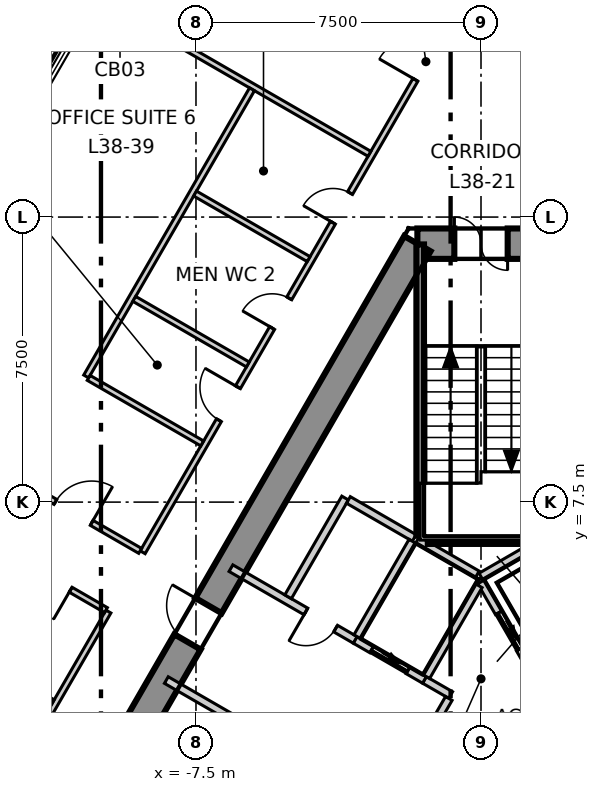
"""IFC4 building model, lengths in metres.
Left out: names, types, materials, properties, quantities, classifications, styles, units other than length and angle.
Written with IfcOpenShell. Run it as: python <this file> out.ifc"""

import sys

from ifc_helpers import new_model, si_unit, direction, frame, frame_2d, origin, place, context, subcontext, project, spatial, polyline, rectangle, outline, extrude, element, fill, save


model = new_model("IFC4")
c1 = context("Model", 3, precision=1e-05, world=origin(), true_north=direction((0.0, 1.0)))
c2 = subcontext(c1, "Body", "Model", "MODEL_VIEW")
j1 = project(units=[si_unit("LENGTHUNIT", "METRE"), si_unit("PLANEANGLEUNIT", "RADIAN")], contexts=[c1])
p1 = place(None, origin())
s1 = spatial("IfcSite", under=j1, at=p1, CompositionType="ELEMENT")
p2 = place(p1, origin())
s2 = spatial("IfcBuilding", under=s1, at=p2, CompositionType="ELEMENT")
p3 = place(p2, frame((0.0, 0.0, 164.3)))
s3 = spatial("IfcBuildingStorey", under=s2, at=p3, CompositionType="ELEMENT", Elevation=164.3)
p4 = place(p3, frame((1.674, 14.3, -0.3), z_axis=(0.0, 0.0, 1.0), x_axis=(-1.0, 0.0, 0.0)))
e1 = element("IfcWall", 1, at=p4, inside=s3, PredefinedType="SHEAR", context=c2, shape_type="SweptSolid", body=[
    extrude(outline(polyline([(-0.231, -0.4), (1.674, -0.4), (3.579, -0.4), (3.117, 0.4), (1.674, 0.4), (0.231, 0.4), (-0.231, -0.4)])), origin(), (0.0, 0.0, 1.0), 4.0),
])
p5 = place(p4, frame((0.974, 0.0, 0.3)))
e2 = element("IfcOpeningElement", 2, at=p5, cuts=e1, PredefinedType="OPENING", context=c2, shape_type="SweptSolid", body=[
    extrude(rectangle(XDim=1.4, YDim=2.1, at=frame_2d((0.7, 1.05))), frame((0.0, 0.41, 0.0), z_axis=(0.0, -1.0, 0.0), x_axis=(1.0, 0.0, 0.0)), (0.0, 0.0, 1.0), 0.82),
])
p6 = place(p3, frame((-1.674, 14.3, -0.3), z_axis=(0.0, 0.0, 1.0), x_axis=(-0.499995765644, -0.866027848477, 0.0)))
e3 = element("IfcWall", 3, at=p6, inside=s3, PredefinedType="SHEAR", context=c2, shape_type="SweptSolid", body=[
    extrude(outline(polyline([(-0.231, -0.4), (1.732, -0.4), (3.695, -0.4), (5.658, -0.4), (7.621, -0.4), (9.584, -0.4), (11.547, -0.4), (13.51, -0.4), (15.473, -0.4), (17.436, -0.4), (19.399, -0.4), (21.362, -0.4), (23.325, -0.4), (22.863, 0.4), (20.977, 0.4), (19.091, 0.4), (17.205, 0.4), (15.319, 0.4), (13.433, 0.4), (11.547, 0.4), (9.661, 0.4), (7.775, 0.4), (5.889, 0.4), (4.003, 0.4), (2.117, 0.4), (0.231, 0.4), (-0.231, -0.4)])), origin(), (0.0, 0.0, 1.0), 4.0),
])
p7 = place(p6, frame((10.997, 0.0, 0.3)))
e4 = element("IfcOpeningElement", 4, at=p7, cuts=e3, PredefinedType="OPENING", context=c2, shape_type="SweptSolid", body=[
    extrude(rectangle(XDim=1.1, YDim=2.1, at=frame_2d((0.55, 1.05))), frame((0.0, 0.41, 0.0), z_axis=(0.0, -1.0, 0.0), x_axis=(1.0, 0.0, 0.0)), (0.0, 0.0, 1.0), 0.82),
])
p8 = place(p3, frame((-2.972, 33.16, 0.0), z_axis=(0.0, 0.0, 1.0), x_axis=(-0.500009959561, -0.866019653553, 0.0)))
e5 = element("IfcWall", 5, at=p8, inside=s3, PredefinedType="ELEMENTEDWALL", context=c2, shape_type="SweptSolid", body=[
    extrude(rectangle(XDim=54.443, YDim=0.2, at=frame_2d((27.222, 0.0))), origin(), (0.0, 0.0, 1.0), 3.7),
])
p9 = place(p8, frame((2.094, 0.0, 0.9)))
e6 = element("IfcOpeningElement", 6, at=p9, cuts=e5, PredefinedType="OPENING", context=c2, shape_type="SweptSolid", body=[
    extrude(rectangle(XDim=4.9, YDim=2.5, at=frame_2d((2.45, 1.25))), frame((0.0, 0.11, 0.0), z_axis=(0.0, -1.0, 0.0), x_axis=(1.0, 0.0, 0.0)), (0.0, 0.0, 1.0), 0.22),
])
p10 = place(p8, frame((8.576, 0.0, 0.9)))
e7 = element("IfcOpeningElement", 7, at=p10, cuts=e5, PredefinedType="OPENING", context=c2, shape_type="SweptSolid", body=[
    extrude(rectangle(XDim=4.9, YDim=2.5, at=frame_2d((2.45, 1.25))), frame((0.0, 0.11, 0.0), z_axis=(0.0, -1.0, 0.0), x_axis=(1.0, 0.0, 0.0)), (0.0, 0.0, 1.0), 0.22),
])
p11 = place(p8, frame((15.058, 0.0, 0.9)))
e8 = element("IfcOpeningElement", 8, at=p11, cuts=e5, PredefinedType="OPENING", context=c2, shape_type="SweptSolid", body=[
    extrude(rectangle(XDim=4.9, YDim=2.5, at=frame_2d((2.45, 1.25))), frame((0.0, 0.11, 0.0), z_axis=(0.0, -1.0, 0.0), x_axis=(1.0, 0.0, 0.0)), (0.0, 0.0, 1.0), 0.22),
])
p12 = place(p8, frame((21.54, 0.0, 0.9)))
e9 = element("IfcOpeningElement", 9, at=p12, cuts=e5, PredefinedType="OPENING", context=c2, shape_type="SweptSolid", body=[
    extrude(rectangle(XDim=4.9, YDim=2.5, at=frame_2d((2.45, 1.25))), frame((0.0, 0.11, 0.0), z_axis=(0.0, -1.0, 0.0), x_axis=(1.0, 0.0, 0.0)), (0.0, 0.0, 1.0), 0.22),
])
p13 = place(p8, frame((28.022, 0.0, 0.9)))
e10 = element("IfcOpeningElement", 10, at=p13, cuts=e5, PredefinedType="OPENING", context=c2, shape_type="SweptSolid", body=[
    extrude(rectangle(XDim=4.9, YDim=2.5, at=frame_2d((2.45, 1.25))), frame((0.0, 0.11, 0.0), z_axis=(0.0, -1.0, 0.0), x_axis=(1.0, 0.0, 0.0)), (0.0, 0.0, 1.0), 0.22),
])
p14 = place(p8, frame((34.505, 0.0, 0.9)))
e11 = element("IfcOpeningElement", 11, at=p14, cuts=e5, PredefinedType="OPENING", context=c2, shape_type="SweptSolid", body=[
    extrude(rectangle(XDim=4.9, YDim=2.5, at=frame_2d((2.45, 1.25))), frame((0.0, 0.11, 0.0), z_axis=(0.0, -1.0, 0.0), x_axis=(1.0, 0.0, 0.0)), (0.0, 0.0, 1.0), 0.22),
])
p15 = place(p8, frame((40.987, 0.0, 0.9)))
e12 = element("IfcOpeningElement", 12, at=p15, cuts=e5, PredefinedType="OPENING", context=c2, shape_type="SweptSolid", body=[
    extrude(rectangle(XDim=4.9, YDim=2.5, at=frame_2d((2.45, 1.25))), frame((0.0, 0.11, 0.0), z_axis=(0.0, -1.0, 0.0), x_axis=(1.0, 0.0, 0.0)), (0.0, 0.0, 1.0), 0.22),
])
p16 = place(p8, frame((47.469, 0.0, 0.9)))
e13 = element("IfcOpeningElement", 13, at=p16, cuts=e5, PredefinedType="OPENING", context=c2, shape_type="SweptSolid", body=[
    extrude(rectangle(XDim=4.9, YDim=2.5, at=frame_2d((2.45, 1.25))), frame((0.0, 0.11, 0.0), z_axis=(0.0, -1.0, 0.0), x_axis=(1.0, 0.0, 0.0)), (0.0, 0.0, 1.0), 0.22),
])
p17 = place(p3, frame((-18.631, -10.669, 0.0), z_axis=(0.0, 0.0, 1.0), x_axis=(0.500000173646, 0.86602530353, 0.0)))
e14 = element("IfcWall", 14, at=p17, inside=s3, PredefinedType="PARTITIONING", context=c2, shape_type="SweptSolid", body=[
    extrude(rectangle(XDim=17.654, YDim=0.15, at=frame_2d((8.827, 0.0))), origin(), (0.0, 0.0, 1.0), 3.7),
])
p18 = place(p17, frame((9.705, 0.0, 0.0)))
e15 = element("IfcOpeningElement", 15, at=p18, cuts=e14, PredefinedType="OPENING", context=c2, shape_type="SweptSolid", body=[
    extrude(rectangle(XDim=1.0, YDim=2.1, at=frame_2d((0.5, 1.05))), frame((0.0, 0.085, 0.0), z_axis=(0.0, -1.0, 0.0), x_axis=(1.0, 0.0, 0.0)), (0.0, 0.0, 1.0), 0.17),
])
p19 = place(p17, frame((2.141, 0.0, 0.0)))
e16 = element("IfcOpeningElement", 16, at=p19, cuts=e14, PredefinedType="OPENING", context=c2, shape_type="SweptSolid", body=[
    extrude(rectangle(XDim=1.1, YDim=2.1, at=frame_2d((0.55, 1.05))), frame((0.0, 0.085, 0.0), z_axis=(0.0, -1.0, 0.0), x_axis=(1.0, 0.0, 0.0)), (0.0, 0.0, 1.0), 0.17),
])
p20 = place(p3, frame((-8.903, 6.18, 0.0), z_axis=(0.0, 0.0, 1.0), x_axis=(0.500010074151, 0.866019587393, 0.0)))
e17 = element("IfcWall", 17, at=p20, inside=s3, PredefinedType="PARTITIONING", context=c2, shape_type="SweptSolid", body=[
    extrude(rectangle(XDim=17.806, YDim=0.15, at=frame_2d((8.903, 0.0))), origin(), (0.0, 0.0, 1.0), 3.7),
])
p21 = place(p20, frame((14.356, 0.0, 0.0)))
e18 = element("IfcOpeningElement", 18, at=p21, cuts=e17, PredefinedType="OPENING", context=c2, shape_type="SweptSolid", body=[
    extrude(rectangle(XDim=1.1, YDim=2.1, at=frame_2d((0.55, 1.05))), frame((0.0, 0.085, 0.0), z_axis=(0.0, -1.0, 0.0), x_axis=(1.0, 0.0, 0.0)), (0.0, 0.0, 1.0), 0.17),
])
p22 = place(p20, frame((10.014, 0.0, 0.0)))
e19 = element("IfcOpeningElement", 19, at=p22, cuts=e17, PredefinedType="OPENING", context=c2, shape_type="SweptSolid", body=[
    extrude(rectangle(XDim=0.9, YDim=2.1, at=frame_2d((0.45, 1.05))), frame((0.0, 0.085, 0.0), z_axis=(0.0, -1.0, 0.0), x_axis=(1.0, 0.0, 0.0)), (0.0, 0.0, 1.0), 0.17),
])
p23 = place(p20, frame((6.814, 0.0, 0.0)))
e20 = element("IfcOpeningElement", 20, at=p23, cuts=e17, PredefinedType="OPENING", context=c2, shape_type="SweptSolid", body=[
    extrude(rectangle(XDim=0.9, YDim=2.1, at=frame_2d((0.45, 1.05))), frame((0.0, 0.085, 0.0), z_axis=(0.0, -1.0, 0.0), x_axis=(1.0, 0.0, 0.0)), (0.0, 0.0, 1.0), 0.17),
])
p24 = place(p20, frame((4.014, 0.0, 0.0)))
e21 = element("IfcOpeningElement", 21, at=p24, cuts=e17, PredefinedType="OPENING", context=c2, shape_type="SweptSolid", body=[
    extrude(rectangle(XDim=1.0, YDim=2.1, at=frame_2d((0.5, 1.05))), frame((0.0, 0.085, 0.0), z_axis=(0.0, -1.0, 0.0), x_axis=(1.0, 0.0, 0.0)), (0.0, 0.0, 1.0), 0.17),
])
p25 = place(p3, frame((-12.475, 8.242, 0.0), z_axis=(0.0, 0.0, 1.0), x_axis=(0.865955608197, -0.500120870022, 0.0)))
e22 = element("IfcWall", 22, at=p25, inside=s3, PredefinedType="PARTITIONING", context=c2, shape_type="SweptSolid", body=[
    extrude(rectangle(XDim=4.049, YDim=0.15, at=frame_2d((2.024, 0.0))), origin(), (0.0, 0.0, 1.0), 3.7),
])
p26 = place(p25, frame((1.475, 0.0, 0.0)))
e23 = element("IfcOpeningElement", 23, at=p26, cuts=e22, PredefinedType="OPENING", context=c2, shape_type="SweptSolid", body=[
    extrude(rectangle(XDim=1.1, YDim=2.1, at=frame_2d((0.55, 1.05))), frame((0.0, 0.085, 0.0), z_axis=(0.0, -1.0, 0.0), x_axis=(1.0, 0.0, 0.0)), (0.0, 0.0, 1.0), 0.17),
])
p27 = place(p3, frame((-13.375, 6.683, 0.0), z_axis=(0.0, 0.0, 1.0), x_axis=(0.865929493314, -0.500166085025, 0.0)))
e24 = element("IfcWall", 24, at=p27, inside=s3, PredefinedType="PARTITIONING", context=c2, shape_type="SweptSolid", body=[
    extrude(rectangle(XDim=4.049, YDim=0.15, at=frame_2d((2.024, 0.0))), origin(), (0.0, 0.0, 1.0), 3.7),
])
p28 = place(p27, frame((2.075, 0.0, 0.0)))
e25 = element("IfcOpeningElement", 25, at=p28, cuts=e24, PredefinedType="OPENING", context=c2, shape_type="SweptSolid", body=[
    extrude(rectangle(XDim=0.9, YDim=2.1, at=frame_2d((0.45, 1.05))), frame((0.0, 0.085, 0.0), z_axis=(0.0, -1.0, 0.0), x_axis=(1.0, 0.0, 0.0)), (0.0, 0.0, 1.0), 0.17),
])
p29 = place(p3, frame((-13.909, 3.758, 0.0), z_axis=(0.0, 0.0, 1.0), x_axis=(0.865962925632, -0.500108199725, 0.0)))
e26 = element("IfcWall", 26, at=p29, inside=s3, PredefinedType="PARTITIONING", context=c2, shape_type="SweptSolid", body=[
    extrude(rectangle(XDim=3.05, YDim=0.15, at=frame_2d((1.525, 0.0))), origin(), (0.0, 0.0, 1.0), 3.7),
])
p30 = place(p3, frame((-10.036, 20.764, 0.0), z_axis=(0.0, 0.0, 1.0), x_axis=(0.866037308103, -0.499979380549, 0.0)))
e27 = element("IfcWall", 27, at=p30, inside=s3, PredefinedType="PARTITIONING", context=c2, shape_type="SweptSolid", body=[
    extrude(rectangle(XDim=8.198, YDim=0.15, at=frame_2d((4.099, 0.0))), origin(), (0.0, 0.0, 1.0), 3.7),
])
p31 = place(p3, frame((-10.389, 10.806, 0.0), z_axis=(0.0, 0.0, 1.0), x_axis=(0.500042162787, 0.86600105972, 0.0)))
e28 = element("IfcWall", 28, at=p31, inside=s3, PredefinedType="PARTITIONING", context=c2, shape_type="SweptSolid", body=[
    extrude(rectangle(XDim=8.725, YDim=0.15, at=frame_2d((4.363, 0.0))), origin(), (0.0, 0.0, 1.0), 3.7),
])
for number, where, z_axis, x_axis in (
    (29, (-10.324, 10.769, 0.0), (0.0, 0.0, 1.0), (0.866, -0.5, 0.0)),
    (30, (-9.124, 12.847, 0.0), (0.0, 0.0, 1.0), (0.866, -0.5, 0.0)),
    (31, (-7.524, 15.619, 0.0), (0.0, 0.0, 1.0), (0.866, -0.5, 0.0)),
):
    element("IfcWall", number, at=place(p3, frame(where, z_axis=z_axis, x_axis=x_axis)), inside=s3, PredefinedType="PARTITIONING", context=c2, shape_type="SweptSolid", body=[
        extrude(rectangle(XDim=3.45, YDim=0.15, at=frame_2d((1.725, 0.0))), origin(), (0.0, 0.0, 1.0), 3.7),
    ])
p32 = place(p3, frame((0.076, 21.468, 0.0), z_axis=(0.0, 0.0, 1.0), x_axis=(0.500024127084, -0.866011473558, 0.0)))
e32 = element("IfcWall", 32, at=p32, inside=s3, PredefinedType="PARTITIONING", context=c2, shape_type="SweptSolid", body=[
    extrude(rectangle(XDim=17.654, YDim=0.15, at=frame_2d((8.827, 0.0))), origin(), (0.0, 0.0, 1.0), 3.7),
])
p33 = place(p32, frame((11.104, 0.0, 0.0)))
e33 = element("IfcOpeningElement", 33, at=p33, cuts=e32, PredefinedType="OPENING", context=c2, shape_type="SweptSolid", body=[
    extrude(rectangle(XDim=1.1, YDim=2.1, at=frame_2d((0.55, 1.05))), frame((0.0, 0.085, 0.0), z_axis=(0.0, -1.0, 0.0), x_axis=(1.0, 0.0, 0.0)), (0.0, 0.0, 1.0), 0.17),
])
p34 = place(p32, frame((2.14, 0.0, 0.0)))
e34 = element("IfcOpeningElement", 34, at=p34, cuts=e32, PredefinedType="OPENING", context=c2, shape_type="SweptSolid", body=[
    extrude(rectangle(XDim=1.1, YDim=2.1, at=frame_2d((0.55, 1.05))), frame((0.0, 0.085, 0.0), z_axis=(0.0, -1.0, 0.0), x_axis=(1.0, 0.0, 0.0)), (0.0, 0.0, 1.0), 0.17),
])
p35 = place(p3, frame((-0.002, 5.542, 0.0), z_axis=(0.0, 0.0, 1.0), x_axis=(0.866103910842, 0.499863997127, 0.0)))
e35 = element("IfcWall", 35, at=p35, inside=s3, PredefinedType="SOLIDWALL", context=c2, shape_type="SweptSolid", body=[
    extrude(rectangle(XDim=4.131, YDim=0.2, at=frame_2d((2.065, 0.0))), origin(), (0.0, 0.0, 1.0), 3.7),
])
p36 = place(p3, frame((0.0, 5.4, 0.0), z_axis=(0.0, 0.0, 1.0), x_axis=(0.500103862429, -0.865965430478, 0.0)))
e36 = element("IfcWall", 36, at=p36, inside=s3, PredefinedType="SOLIDWALL", context=c2, shape_type="SweptSolid", body=[
    extrude(rectangle(XDim=2.973, YDim=0.2, at=frame_2d((1.487, 0.0))), origin(), (0.0, 0.0, 1.0), 3.7),
])
p37 = place(p36, frame((0.937, 0.0, 0.0)))
e37 = element("IfcOpeningElement", 37, at=p37, cuts=e36, PredefinedType="OPENING", context=c2, shape_type="SweptSolid", body=[
    extrude(rectangle(XDim=1.1, YDim=2.1, at=frame_2d((0.55, 1.05))), frame((0.0, 0.11, 0.0), z_axis=(0.0, -1.0, 0.0), x_axis=(1.0, 0.0, 0.0)), (0.0, 0.0, 1.0), 0.22),
])
p38 = place(p3, frame((-8.28, 2.818, 0.0), z_axis=(0.0, 0.0, 1.0), x_axis=(0.86600175068, -0.50004096614, 0.0)))
e38 = element("IfcWall", 38, at=p38, inside=s3, PredefinedType="SOLIDWALL", context=c2, shape_type="SweptSolid", body=[
    extrude(rectangle(XDim=3.782, YDim=0.2, at=frame_2d((1.891, 0.0))), origin(), (0.0, 0.0, 1.0), 3.7),
])
p39 = place(p38, frame((2.18, 0.0, 0.0)))
e39 = element("IfcOpeningElement", 39, at=p39, cuts=e38, PredefinedType="OPENING", context=c2, shape_type="SweptSolid", body=[
    extrude(rectangle(XDim=1.1, YDim=2.1, at=frame_2d((0.55, 1.05))), frame((0.0, 0.11, 0.0), z_axis=(0.0, -1.0, 0.0), x_axis=(1.0, 0.0, 0.0)), (0.0, 0.0, 1.0), 0.22),
])
p40 = place(p3, frame((-6.58, 5.762, 0.0), z_axis=(0.0, 0.0, 1.0), x_axis=(0.866029704776, -0.49999255039, 0.0)))
e40 = element("IfcWall", 40, at=p40, inside=s3, PredefinedType="SOLIDWALL", context=c2, shape_type="SweptSolid", body=[
    extrude(rectangle(XDim=3.782, YDim=0.2, at=frame_2d((1.891, 0.0))), origin(), (0.0, 0.0, 1.0), 3.7),
])
p41 = place(p40, frame((2.279, 0.0, 0.0)))
e41 = element("IfcOpeningElement", 41, at=p41, cuts=e40, PredefinedType="OPENING", context=c2, shape_type="SweptSolid", body=[
    extrude(rectangle(XDim=0.9, YDim=2.1, at=frame_2d((0.45, 1.05))), frame((0.0, 0.11, 0.0), z_axis=(0.0, -1.0, 0.0), x_axis=(1.0, 0.0, 0.0)), (0.0, 0.0, 1.0), 0.22),
])
p42 = place(p3, frame((-1.488, 2.822, 0.0), z_axis=(0.0, 0.0, 1.0), x_axis=(0.866236612152, -0.499633997809, 0.0)))
e42 = element("IfcWall", 42, at=p42, inside=s3, PredefinedType="SOLIDWALL", context=c2, shape_type="SweptSolid", body=[
    extrude(rectangle(XDim=0.796, YDim=0.2, at=frame_2d((0.398, 0.0))), origin(), (0.0, 0.0, 1.0), 3.7),
])
p43 = place(p3, frame((-5.076, 5.009, 0.0), z_axis=(0.0, 0.0, 1.0), x_axis=(0.50002537861, 0.866010750942, 0.0)))
e43 = element("IfcWall", 43, at=p43, inside=s3, PredefinedType="SOLIDWALL", context=c2, shape_type="SweptSolid", body=[
    extrude(rectangle(XDim=3.0, YDim=0.2, at=frame_2d((1.5, 0.0))), origin(), (0.0, 0.0, 1.0), 3.7),
])
p44 = place(p3, frame((-3.489, 7.557, 0.0), z_axis=(0.0, 0.0, 1.0), x_axis=(0.866010750942, -0.50002537861, 0.0)))
e44 = element("IfcWall", 44, at=p44, inside=s3, PredefinedType="SOLIDWALL", context=c2, shape_type="SweptSolid", body=[
    extrude(rectangle(XDim=2.0, YDim=0.2, at=frame_2d((1.0, 0.0))), origin(), (0.0, 0.0, 1.0), 3.7),
])
p45 = place(p3, frame((-2.444, -0.433, 0.0), z_axis=(0.0, 0.0, 1.0), x_axis=(0.500035624827, 0.866004834804, 0.0)))
e45 = element("IfcWall", 45, at=p45, inside=s3, PredefinedType="SOLIDWALL", context=c2, shape_type="SweptSolid", body=[
    extrude(rectangle(XDim=3.194, YDim=0.2, at=frame_2d((1.597, 0.0))), origin(), (0.0, 0.0, 1.0), 3.7),
])
p46 = place(p3, frame((-3.309, 3.873, 0.0), z_axis=(0.0, 0.0, 1.0), x_axis=(0.866098583652, -0.499873227325, 0.0)))
e46 = element("IfcWall", 46, at=p46, inside=s3, PredefinedType="SOLIDWALL", context=c2, shape_type="SweptSolid", body=[
    extrude(rectangle(XDim=2.103, YDim=0.2, at=frame_2d((1.051, 0.0))), origin(), (0.0, 0.0, 1.0), 3.7),
])
p47 = place(p46, frame((0.502, 0.0, 0.0)))
e47 = element("IfcOpeningElement", 47, at=p47, cuts=e46, PredefinedType="OPENING", context=c2, shape_type="SweptSolid", body=[
    extrude(rectangle(XDim=1.1, YDim=2.1, at=frame_2d((0.55, 1.05))), frame((0.0, 0.11, 0.0), z_axis=(0.0, -1.0, 0.0), x_axis=(1.0, 0.0, 0.0)), (0.0, 0.0, 1.0), 0.22),
])
p48 = place(p3, frame((-3.257, 3.959, 0.0), z_axis=(0.0, 0.0, 1.0), x_axis=(0.50012328804, 0.865954211699, 0.0)))
e48 = element("IfcWall", 48, at=p48, inside=s3, PredefinedType="SOLIDWALL", context=c2, shape_type="SweptSolid", body=[
    extrude(rectangle(XDim=2.9, YDim=0.2, at=frame_2d((1.45, 0.0))), origin(), (0.0, 0.0, 1.0), 3.7),
])
p49 = place(p3, frame((-1.67, 6.507, 0.0), z_axis=(0.0, 0.0, 1.0), x_axis=(0.865941441609, -0.500145398563, 0.0)))
e49 = element("IfcWall", 49, at=p49, inside=s3, PredefinedType="SOLIDWALL", context=c2, shape_type="SweptSolid", body=[
    extrude(rectangle(XDim=1.815, YDim=0.2, at=frame_2d((0.908, 0.0))), origin(), (0.0, 0.0, 1.0), 3.7),
])
p50 = place(p3, frame((-1.438, 2.909, 0.0), z_axis=(0.0, 0.0, 1.0), x_axis=(0.499829630636, 0.866123744241, 0.0)))
e50 = element("IfcWall", 50, at=p50, inside=s3, PredefinedType="SOLIDWALL", context=c2, shape_type="SweptSolid", body=[
    extrude(rectangle(XDim=2.761, YDim=0.2, at=frame_2d((1.38, 0.0))), origin(), (0.0, 0.0, 1.0), 3.7),
])
p51 = place(p3, frame((-1.4, 6.5, 0.0), z_axis=(0.0, 0.0, 1.0), x_axis=(1.0, 0.0, 0.0)))
e51 = element("IfcWall", 51, at=p51, inside=s3, PredefinedType="SOLIDWALL", context=c2, shape_type="SweptSolid", body=[
    extrude(rectangle(XDim=2.8, YDim=0.2, at=frame_2d((1.4, 0.0))), origin(), (0.0, 0.0, 1.0), 3.7),
])
p52 = place(p3, frame((-1.6, 6.615, 0.0), z_axis=(0.0, 0.0, 1.0), x_axis=(0.0, 1.0, 0.0)))
e52 = element("IfcWall", 52, at=p52, inside=s3, PredefinedType="SOLIDWALL", context=c2, shape_type="SweptSolid", body=[
    extrude(rectangle(XDim=7.665, YDim=0.2, at=frame_2d((3.833, 0.0))), origin(), (0.0, 0.0, 1.0), 3.7),
])
p53 = place(p11, origin())
e53 = element("IfcWindow", 53, at=p53, inside=s3, PartitioningType="SINGLE_PANEL", PredefinedType="WINDOW", context=c2, shape_type="SweptSolid", body=[
    extrude(rectangle(XDim=4.9, YDim=2.5, at=frame_2d((2.45, 1.25))), frame((0.0, 0.03, 0.0), z_axis=(0.0, -1.0, 0.0), x_axis=(1.0, 0.0, 0.0)), (0.0, 0.0, 1.0), 0.06),
])
fill(e8, e53)
p54 = place(p37, origin())
e54 = element("IfcDoor", 54, at=p54, inside=s3, OperationType="SLIDING_TO_LEFT", PredefinedType="DOOR", context=c2, shape_type="SweptSolid", body=[
    extrude(rectangle(XDim=1.1, YDim=2.1, at=frame_2d((0.55, 1.05))), frame((0.0, 0.025, 0.0), z_axis=(0.0, -1.0, 0.0), x_axis=(1.0, 0.0, 0.0)), (0.0, 0.0, 1.0), 0.05),
])
fill(e37, e54)
p55 = place(p47, origin())
e55 = element("IfcDoor", 55, at=p55, inside=s3, OperationType="SLIDING_TO_LEFT", PredefinedType="DOOR", context=c2, shape_type="SweptSolid", body=[
    extrude(rectangle(XDim=1.1, YDim=2.1, at=frame_2d((0.55, 1.05))), frame((0.0, 0.025, 0.0), z_axis=(0.0, -1.0, 0.0), x_axis=(1.0, 0.0, 0.0)), (0.0, 0.0, 1.0), 0.05),
])
fill(e47, e55)
p56 = place(p41, origin())
e56 = element("IfcDoor", 56, at=p56, inside=s3, OperationType="SINGLE_SWING_LEFT", PredefinedType="DOOR", context=c2, shape_type="SweptSolid", body=[
    extrude(rectangle(XDim=0.9, YDim=2.1, at=frame_2d((0.45, 1.05))), frame((0.0, 0.025, 0.0), z_axis=(0.0, -1.0, 0.0), x_axis=(1.0, 0.0, 0.0)), (0.0, 0.0, 1.0), 0.05),
])
fill(e41, e56)
p57 = place(p21, origin())
e57 = element("IfcDoor", 57, at=p57, inside=s3, OperationType="SINGLE_SWING_RIGHT", PredefinedType="DOOR", context=c2, shape_type="SweptSolid", body=[
    extrude(rectangle(XDim=1.1, YDim=2.1, at=frame_2d((0.55, 1.05))), frame((0.0, 0.025, 0.0), z_axis=(0.0, -1.0, 0.0), x_axis=(1.0, 0.0, 0.0)), (0.0, 0.0, 1.0), 0.05),
])
fill(e18, e57)
p58 = place(p26, origin())
e58 = element("IfcDoor", 58, at=p58, inside=s3, OperationType="SINGLE_SWING_LEFT", PredefinedType="DOOR", context=c2, shape_type="SweptSolid", body=[
    extrude(rectangle(XDim=1.1, YDim=2.1, at=frame_2d((0.55, 1.05))), frame((0.0, 0.025, 0.0), z_axis=(0.0, -1.0, 0.0), x_axis=(1.0, 0.0, 0.0)), (0.0, 0.0, 1.0), 0.05),
])
fill(e23, e58)
p59 = place(p22, origin())
e59 = element("IfcDoor", 59, at=p59, inside=s3, OperationType="SINGLE_SWING_RIGHT", PredefinedType="DOOR", context=c2, shape_type="SweptSolid", body=[
    extrude(rectangle(XDim=0.9, YDim=2.1, at=frame_2d((0.45, 1.05))), frame((0.0, 0.025, 0.0), z_axis=(0.0, -1.0, 0.0), x_axis=(1.0, 0.0, 0.0)), (0.0, 0.0, 1.0), 0.05),
])
fill(e19, e59)
p60 = place(p23, origin())
e60 = element("IfcDoor", 60, at=p60, inside=s3, OperationType="SINGLE_SWING_RIGHT", PredefinedType="DOOR", context=c2, shape_type="SweptSolid", body=[
    extrude(rectangle(XDim=0.9, YDim=2.1, at=frame_2d((0.45, 1.05))), frame((0.0, 0.025, 0.0), z_axis=(0.0, -1.0, 0.0), x_axis=(1.0, 0.0, 0.0)), (0.0, 0.0, 1.0), 0.05),
])
fill(e20, e60)
p61 = place(p24, origin())
e61 = element("IfcDoor", 61, at=p61, inside=s3, OperationType="SINGLE_SWING_LEFT", PredefinedType="DOOR", context=c2, shape_type="SweptSolid", body=[
    extrude(rectangle(XDim=1.0, YDim=2.1, at=frame_2d((0.5, 1.05))), frame((0.0, 0.025, 0.0), z_axis=(0.0, -1.0, 0.0), x_axis=(1.0, 0.0, 0.0)), (0.0, 0.0, 1.0), 0.05),
])
fill(e21, e61)
p62 = place(p28, origin())
e62 = element("IfcDoor", 62, at=p62, inside=s3, OperationType="SINGLE_SWING_RIGHT", PredefinedType="DOOR", context=c2, shape_type="SweptSolid", body=[
    extrude(rectangle(XDim=0.9, YDim=2.1, at=frame_2d((0.45, 1.05))), frame((0.0, 0.025, 0.0), z_axis=(0.0, -1.0, 0.0), x_axis=(1.0, 0.0, 0.0)), (0.0, 0.0, 1.0), 0.05),
])
fill(e25, e62)
p63 = place(p5, origin())
e63 = element("IfcDoor", 63, at=p63, inside=s3, OperationType="DOUBLE_DOOR_SINGLE_SWING", PredefinedType="DOOR", context=c2, shape_type="SweptSolid", body=[
    extrude(rectangle(XDim=1.4, YDim=2.1, at=frame_2d((0.7, 1.05))), frame((0.0, 0.025, 0.0), z_axis=(0.0, -1.0, 0.0), x_axis=(1.0, 0.0, 0.0)), (0.0, 0.0, 1.0), 0.05),
])
fill(e2, e63)
p64 = place(p7, origin())
e64 = element("IfcDoor", 64, at=p64, inside=s3, OperationType="SINGLE_SWING_LEFT", PredefinedType="DOOR", context=c2, shape_type="SweptSolid", body=[
    extrude(rectangle(XDim=1.1, YDim=2.1, at=frame_2d((0.55, 1.05))), frame((0.0, 0.025, 0.0), z_axis=(0.0, -1.0, 0.0), x_axis=(1.0, 0.0, 0.0)), (0.0, 0.0, 1.0), 0.05),
])
fill(e4, e64)
save(model, sys.argv[1])
